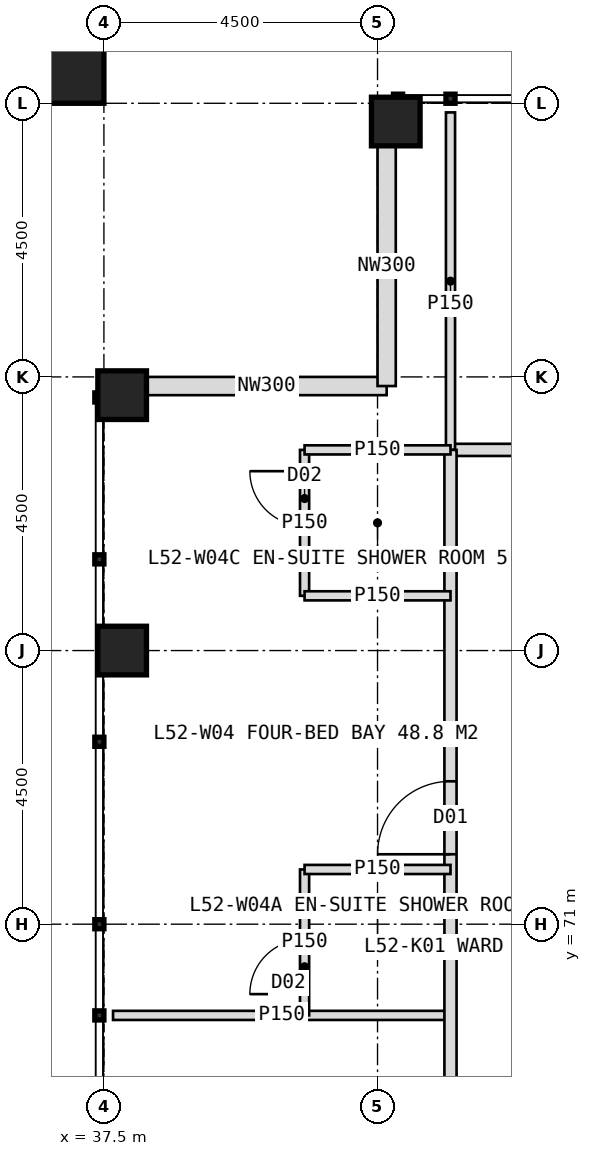
"""IFC4 building model, lengths in metres.
Left out: names, types, materials, properties, quantities, classifications, styles, units other than length and angle.
Written with IfcOpenShell. Run it as: python <this file> out.ifc"""

import sys

from ifc_helpers import new_model, si_unit, direction, frame, frame_2d, origin, origin_2d, place, context, subcontext, project, spatial, rectangle, hollow_rectangle, extrude, element, fill, save


model = new_model("IFC4")
c1 = context("Model", 3, precision=1e-05, world=origin(), true_north=direction((0.0, 1.0)))
c2 = subcontext(c1, "Body", "Model", "MODEL_VIEW")
j1 = project(units=[si_unit("LENGTHUNIT", "METRE"), si_unit("PLANEANGLEUNIT", "RADIAN")], contexts=[c1])
p1 = place(None, origin())
s1 = spatial("IfcSite", under=j1, at=p1, CompositionType="ELEMENT")
p2 = place(p1, origin())
s2 = spatial("IfcBuilding", under=s1, at=p2, CompositionType="ELEMENT")
p3 = place(p2, frame((0.0, 0.0, 217.0)))
s3 = spatial("IfcBuildingStorey", under=s2, at=p3, CompositionType="ELEMENT", Elevation=217.0)
for number, where, z_axis, x_axis in (
    (1, (42.3, 84.2, 0.0), (0.0, 0.0, 1.0), (1.0, 0.0, 0.0)),
    (2, (37.8, 75.5, 0.0), (0.0, 0.0, 1.0), (1.0, 0.0, 0.0)),
    (3, (37.8, 79.7, 0.0), (0.0, 0.0, 1.0), (1.0, 0.0, 0.0)),
):
    element("IfcColumn", number, at=place(p3, frame(where, z_axis=z_axis, x_axis=x_axis)), inside=s3, PredefinedType="COLUMN", context=c2, shape_type="SweptSolid", body=[
        extrude(hollow_rectangle(XDim=0.8, YDim=0.8, WallThickness=0.08, at=origin_2d()), origin(), (0.0, 0.0, 1.0), 4.0),
    ])
p4 = place(p3, frame((36.9, 85.1, 0.0), z_axis=(0.0, 0.0, 1.0), x_axis=(1.0, 0.0, 0.0)))
e4 = element("IfcColumn", 4, at=p4, inside=s3, PredefinedType="COLUMN", context=c2, shape_type="SweptSolid", body=[
    extrude(hollow_rectangle(XDim=1.2, YDim=1.2, WallThickness=0.07, at=origin_2d()), origin(), (0.0, 0.0, 1.0), 4.0),
])
for number, where, z_axis, x_axis in (
    (5, (38.2, 79.85, 0.0), (0.0, 0.0, 1.0), (1.0, 0.0, 0.0)),
    (6, (42.15, 79.85, 0.0), (0.0, 0.0, 1.0), (0.0, 1.0, 0.0)),
):
    element("IfcWall", number, at=place(p3, frame(where, z_axis=z_axis, x_axis=x_axis)), inside=s3, PredefinedType="ELEMENTEDWALL", context=c2, shape_type="SweptSolid", body=[
        extrude(rectangle(XDim=3.95, YDim=0.3, at=frame_2d((1.975, 0.0))), origin(), (0.0, 0.0, 1.0), 2.85),
    ])
p5 = place(p3, frame((43.2, 78.8, 0.0), z_axis=(0.0, 0.0, 1.0), x_axis=(1.0, 0.0, 0.0)))
e7 = element("IfcWall", 7, at=p5, inside=s3, PredefinedType="PARTITIONING", context=c2, shape_type="SweptSolid", body=[
    extrude(rectangle(XDim=33.6, YDim=0.2, at=frame_2d((16.8, 0.0))), origin(), (0.0, 0.0, 1.0), 3.75),
])
p6 = place(p5, frame((4.9, 0.0, 0.0)))
e8 = element("IfcOpeningElement", 8, at=p6, cuts=e7, PredefinedType="OPENING", context=c2, shape_type="SweptSolid", body=[
    extrude(rectangle(XDim=1.0, YDim=2.1, at=frame_2d((0.5, 1.05))), frame((0.0, 0.11, 0.0), z_axis=(0.0, -1.0, 0.0), x_axis=(1.0, 0.0, 0.0)), (0.0, 0.0, 1.0), 0.22),
])
p7 = place(p5, frame((14.05, 0.0, 0.0)))
e9 = element("IfcOpeningElement", 9, at=p7, cuts=e7, PredefinedType="OPENING", context=c2, shape_type="SweptSolid", body=[
    extrude(rectangle(XDim=1.2, YDim=2.2, at=frame_2d((0.6, 1.1))), frame((0.0, 0.11, 0.0), z_axis=(0.0, -1.0, 0.0), x_axis=(1.0, 0.0, 0.0)), (0.0, 0.0, 1.0), 0.22),
])
p8 = place(p5, frame((22.45, 0.0, 0.0)))
e10 = element("IfcOpeningElement", 10, at=p8, cuts=e7, PredefinedType="OPENING", context=c2, shape_type="SweptSolid", body=[
    extrude(rectangle(XDim=1.2, YDim=2.2, at=frame_2d((0.6, 1.1))), frame((0.0, 0.11, 0.0), z_axis=(0.0, -1.0, 0.0), x_axis=(1.0, 0.0, 0.0)), (0.0, 0.0, 1.0), 0.22),
])
for number, where, z_axis, x_axis in (
    (11, (43.2, 78.8, 0.0), (0.0, 0.0, 1.0), (0.0, 1.0, 0.0)),
    (12, (43.2, 69.5, 0.0), (0.0, 0.0, 1.0), (-1.0, 0.0, 0.0)),
):
    element("IfcWall", number, at=place(p3, frame(where, z_axis=z_axis, x_axis=x_axis)), inside=s3, PredefinedType="PARTITIONING", context=c2, shape_type="SweptSolid", body=[
        extrude(rectangle(XDim=5.55, YDim=0.15, at=frame_2d((2.775, 0.0))), origin(), (0.0, 0.0, 1.0), 3.75),
    ])
p9 = place(p3, frame((43.2, 45.2, 0.0), z_axis=(0.0, 0.0, 1.0), x_axis=(0.0, 1.0, 0.0)))
e13 = element("IfcWall", 13, at=p9, inside=s3, PredefinedType="PARTITIONING", context=c2, shape_type="SweptSolid", body=[
    extrude(rectangle(XDim=33.6, YDim=0.2, at=frame_2d((16.8, 0.0))), origin(), (0.0, 0.0, 1.0), 3.75),
])
p10 = place(p9, frame((3.25, 0.0, 0.0)))
e14 = element("IfcOpeningElement", 14, at=p10, cuts=e13, PredefinedType="OPENING", context=c2, shape_type="SweptSolid", body=[
    extrude(rectangle(XDim=1.2, YDim=2.2, at=frame_2d((0.6, 1.1))), frame((0.0, 0.11, 0.0), z_axis=(0.0, -1.0, 0.0), x_axis=(1.0, 0.0, 0.0)), (0.0, 0.0, 1.0), 0.22),
])
p11 = place(p9, frame((11.05, 0.0, 0.0)))
e15 = element("IfcOpeningElement", 15, at=p11, cuts=e13, PredefinedType="OPENING", context=c2, shape_type="SweptSolid", body=[
    extrude(rectangle(XDim=1.2, YDim=2.2, at=frame_2d((0.6, 1.1))), frame((0.0, 0.11, 0.0), z_axis=(0.0, -1.0, 0.0), x_axis=(1.0, 0.0, 0.0)), (0.0, 0.0, 1.0), 0.22),
])
p12 = place(p9, frame((20.05, 0.0, 0.0)))
e16 = element("IfcOpeningElement", 16, at=p12, cuts=e13, PredefinedType="OPENING", context=c2, shape_type="SweptSolid", body=[
    extrude(rectangle(XDim=1.2, YDim=2.2, at=frame_2d((0.6, 1.1))), frame((0.0, 0.11, 0.0), z_axis=(0.0, -1.0, 0.0), x_axis=(1.0, 0.0, 0.0)), (0.0, 0.0, 1.0), 0.22),
])
p13 = place(p9, frame((26.95, 0.0, 0.0)))
e17 = element("IfcOpeningElement", 17, at=p13, cuts=e13, PredefinedType="OPENING", context=c2, shape_type="SweptSolid", body=[
    extrude(rectangle(XDim=1.2, YDim=2.2, at=frame_2d((0.6, 1.1))), frame((0.0, 0.11, 0.0), z_axis=(0.0, -1.0, 0.0), x_axis=(1.0, 0.0, 0.0)), (0.0, 0.0, 1.0), 0.22),
])
p14 = place(p3, frame((40.8, 69.5, 0.0), z_axis=(0.0, 0.0, 1.0), x_axis=(0.0, 1.0, 0.0)))
e18 = element("IfcWall", 18, at=p14, inside=s3, PredefinedType="PARTITIONING", context=c2, shape_type="SweptSolid", body=[
    extrude(rectangle(XDim=2.4, YDim=0.15, at=frame_2d((1.2, 0.0))), origin(), (0.0, 0.0, 1.0), 3.75),
])
p15 = place(p14, frame((0.35, 0.0, 0.0)))
e19 = element("IfcOpeningElement", 19, at=p15, cuts=e18, PredefinedType="OPENING", context=c2, shape_type="SweptSolid", body=[
    extrude(rectangle(XDim=0.9, YDim=2.1, at=frame_2d((0.45, 1.05))), frame((0.0, 0.085, 0.0), z_axis=(0.0, -1.0, 0.0), x_axis=(1.0, 0.0, 0.0)), (0.0, 0.0, 1.0), 0.17),
])
p16 = place(p3, frame((43.2, 71.9, 0.0), z_axis=(0.0, 0.0, 1.0), x_axis=(-1.0, 0.0, 0.0)))
e20 = element("IfcWall", 20, at=p16, inside=s3, PredefinedType="PARTITIONING", context=c2, shape_type="SweptSolid", body=[
    extrude(rectangle(XDim=2.4, YDim=0.15, at=frame_2d((1.2, 0.0))), origin(), (0.0, 0.0, 1.0), 3.75),
])
p17 = place(p3, frame((40.8, 76.4, 0.0), z_axis=(0.0, 0.0, 1.0), x_axis=(0.0, 1.0, 0.0)))
e21 = element("IfcWall", 21, at=p17, inside=s3, PredefinedType="PARTITIONING", context=c2, shape_type="SweptSolid", body=[
    extrude(rectangle(XDim=2.4, YDim=0.15, at=frame_2d((1.2, 0.0))), origin(), (0.0, 0.0, 1.0), 3.75),
])
p18 = place(p17, frame((1.15, 0.0, 0.0)))
e22 = element("IfcOpeningElement", 22, at=p18, cuts=e21, PredefinedType="OPENING", context=c2, shape_type="SweptSolid", body=[
    extrude(rectangle(XDim=0.9, YDim=2.1, at=frame_2d((0.45, 1.05))), frame((0.0, 0.085, 0.0), z_axis=(0.0, -1.0, 0.0), x_axis=(1.0, 0.0, 0.0)), (0.0, 0.0, 1.0), 0.17),
])
for number, where, z_axis, x_axis in (
    (23, (43.2, 76.4, 0.0), (0.0, 0.0, 1.0), (-1.0, 0.0, 0.0)),
    (24, (43.2, 78.8, 0.0), (0.0, 0.0, 1.0), (-1.0, 0.0, 0.0)),
):
    element("IfcWall", number, at=place(p3, frame(where, z_axis=z_axis, x_axis=x_axis)), inside=s3, PredefinedType="PARTITIONING", context=c2, shape_type="SweptSolid", body=[
        extrude(rectangle(XDim=2.4, YDim=0.15, at=frame_2d((1.2, 0.0))), origin(), (0.0, 0.0, 1.0), 3.75),
    ])
p19 = place(p13, origin())
e25 = element("IfcDoor", 25, at=p19, inside=s3, OperationType="SINGLE_SWING_LEFT", PredefinedType="DOOR", context=c2, shape_type="SweptSolid", body=[
    extrude(rectangle(XDim=1.2, YDim=2.2, at=frame_2d((0.6, 1.1))), frame((0.0, 0.025, 0.0), z_axis=(0.0, -1.0, 0.0), x_axis=(1.0, 0.0, 0.0)), (0.0, 0.0, 1.0), 0.05),
])
fill(e17, e25)
p20 = place(p15, origin())
e26 = element("IfcDoor", 26, at=p20, inside=s3, OperationType="SINGLE_SWING_LEFT", PredefinedType="DOOR", context=c2, shape_type="SweptSolid", body=[
    extrude(rectangle(XDim=0.9, YDim=2.1, at=frame_2d((0.45, 1.05))), frame((0.0, 0.025, 0.0), z_axis=(0.0, -1.0, 0.0), x_axis=(1.0, 0.0, 0.0)), (0.0, 0.0, 1.0), 0.05),
])
fill(e19, e26)
p21 = place(p18, origin())
e27 = element("IfcDoor", 27, at=p21, inside=s3, OperationType="SINGLE_SWING_RIGHT", PredefinedType="DOOR", context=c2, shape_type="SweptSolid", body=[
    extrude(rectangle(XDim=0.9, YDim=2.1, at=frame_2d((0.45, 1.05))), frame((0.0, 0.025, 0.0), z_axis=(0.0, -1.0, 0.0), x_axis=(1.0, 0.0, 0.0)), (0.0, 0.0, 1.0), 0.05),
])
fill(e22, e27)
save(model, sys.argv[1])
